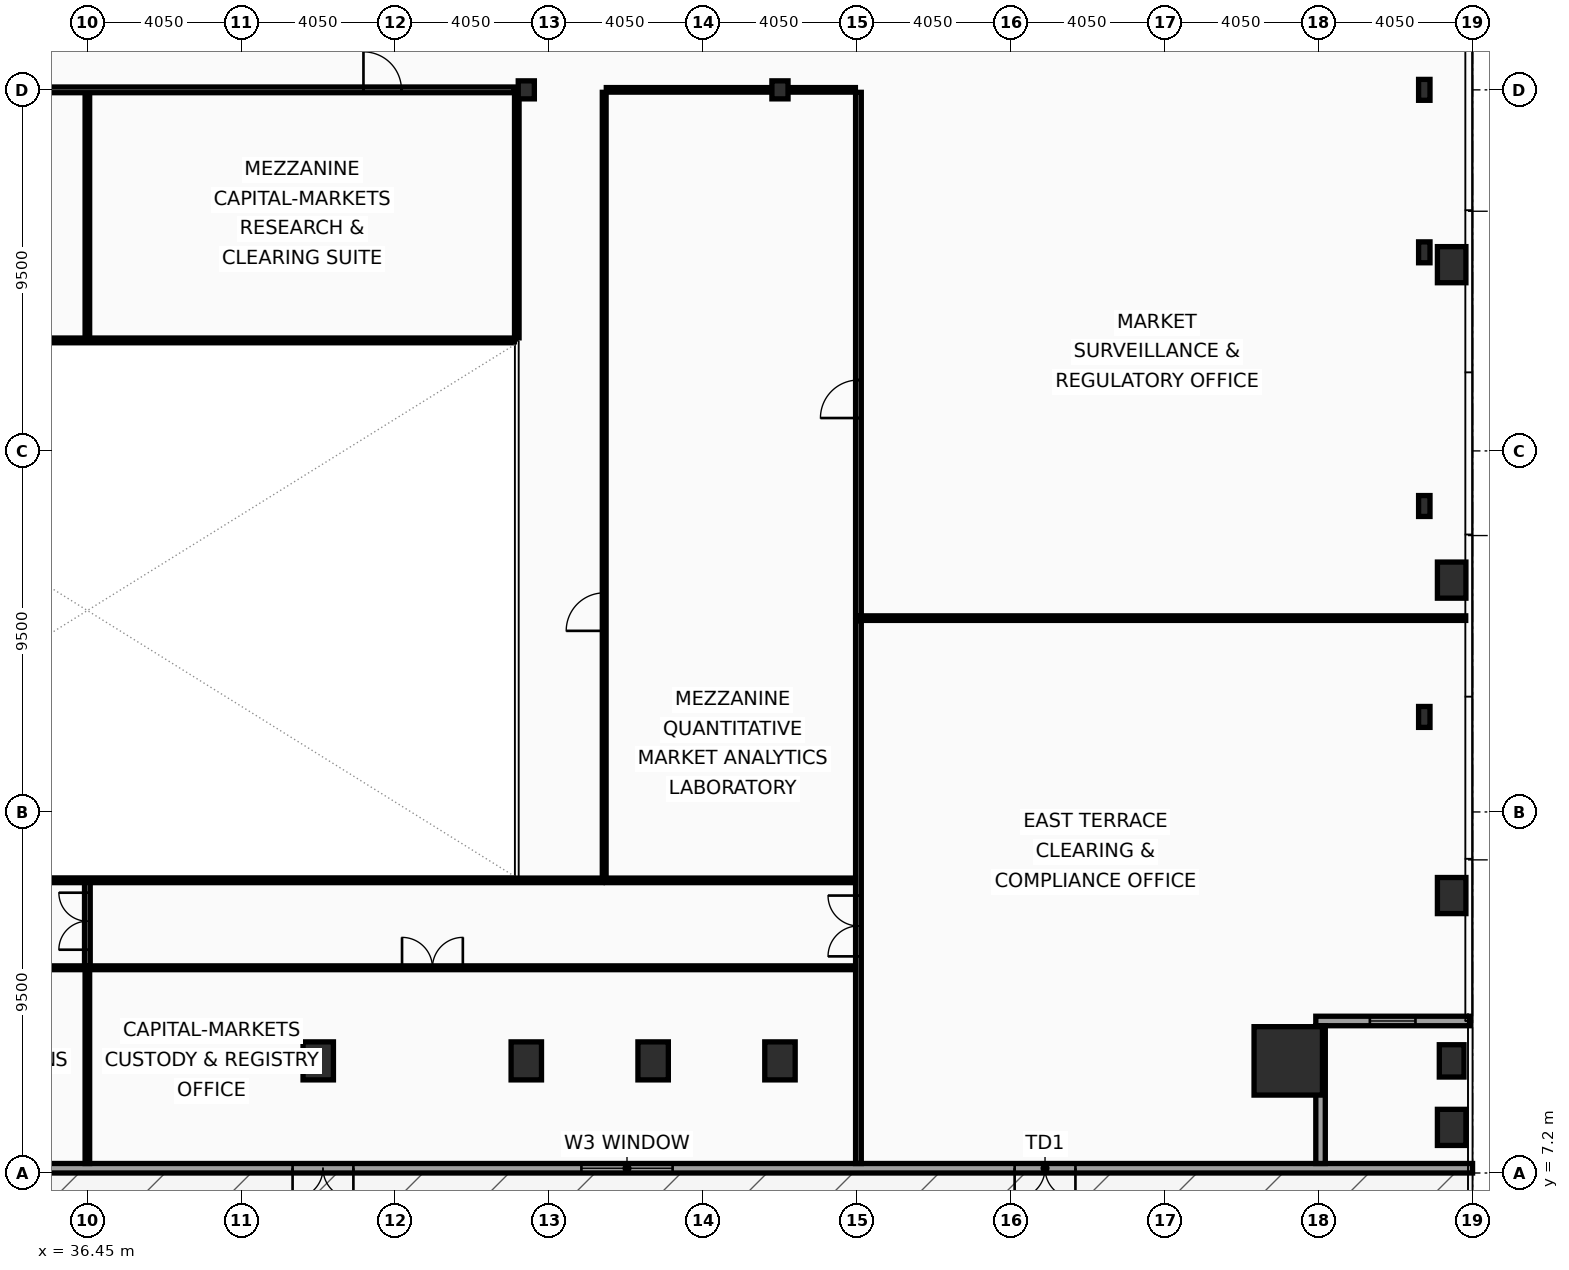
"""IFC4 building model, lengths in metres.
Left out: names, types, materials, properties, quantities, classifications, styles, units other than length and angle.
Written with IfcOpenShell. Run it as: python <this file> out.ifc"""

import sys

from ifc_helpers import new_model, si_unit, direction, frame, frame_2d, origin, origin_2d, place, context, subcontext, project, spatial, rectangle, hollow_rectangle, i_section, extrude, element, fill, save


model = new_model("IFC4")
c1 = context("Model", 3, precision=1e-05, world=origin(), true_north=direction((0.0, 1.0)))
c2 = subcontext(c1, "Body", "Model", "MODEL_VIEW")
j1 = project(units=[si_unit("LENGTHUNIT", "METRE"), si_unit("PLANEANGLEUNIT", "RADIAN")], contexts=[c1])
p1 = place(None, origin())
s1 = spatial("IfcSite", under=j1, at=p1, CompositionType="ELEMENT")
p2 = place(p1, origin())
s2 = spatial("IfcBuilding", under=s1, at=p2, CompositionType="ELEMENT")
p3 = place(p2, frame((0.0, 0.0, 10.4)))
s3 = spatial("IfcBuildingStorey", under=s2, at=p3, CompositionType="ELEMENT", Elevation=10.4)
p4 = place(p3, frame((68.05, 10.15, 0.0), z_axis=(0.0, 0.0, 1.0), x_axis=(1.0, 0.0, 0.0)))
e1 = element("IfcColumn", 1, at=p4, inside=s3, PredefinedType="COLUMN", context=c2, shape_type="SweptSolid", body=[
    extrude(hollow_rectangle(XDim=1.8, YDim=1.8, WallThickness=0.08, at=origin_2d()), origin(), (0.0, 0.0, 1.0), 5.0),
])
for number, where, z_axis, x_axis in (
    (2, (42.525, 10.15, 0.0), (0.0, 0.0, 1.0), (1.0, 0.0, 0.0)),
    (3, (48.0, 10.15, 0.0), (0.0, 0.0, 1.0), (1.0, 0.0, 0.0)),
    (4, (51.337, 10.15, 0.0), (0.0, 0.0, 1.0), (1.0, 0.0, 0.0)),
    (5, (54.675, 10.15, 0.0), (0.0, 0.0, 1.0), (1.0, 0.0, 0.0)),
):
    element("IfcColumn", number, at=place(p3, frame(where, z_axis=z_axis, x_axis=x_axis)), inside=s3, PredefinedType="COLUMN", context=c2, shape_type="SweptSolid", body=[
        extrude(hollow_rectangle(XDim=0.8, YDim=1.0, WallThickness=0.055, at=origin_2d()), origin(), (0.0, 0.0, 1.0), 5.0),
    ])
for number, where, z_axis, x_axis in (
    (6, (71.63, 19.2, 0.0), (0.0, 0.0, 1.0), (1.0, 0.0, 0.0)),
    (7, (71.63, 24.75, 0.0), (0.0, 0.0, 1.0), (1.0, 0.0, 0.0)),
    (8, (71.63, 31.425, 0.0), (0.0, 0.0, 1.0), (1.0, 0.0, 0.0)),
    (9, (71.63, 35.7, 0.0), (0.0, 0.0, 1.0), (1.0, 0.0, 0.0)),
):
    element("IfcColumn", number, at=place(p3, frame(where, z_axis=z_axis, x_axis=x_axis)), inside=s3, PredefinedType="COLUMN", context=c2, shape_type="SweptSolid", body=[
        extrude(i_section(OverallWidth=0.3, OverallDepth=0.55, WebThickness=0.015, FlangeThickness=0.029, at=origin_2d()), origin(), (0.0, 0.0, 1.0), 5.0),
    ])
for number, where, z_axis, x_axis in (
    (10, (48.0, 35.7, 0.0), (0.0, 0.0, 1.0), (1.0, 0.0, 0.0)),
    (11, (54.675, 35.7, 0.0), (0.0, 0.0, 1.0), (1.0, 0.0, 0.0)),
):
    element("IfcColumn", number, at=place(p3, frame(where, z_axis=z_axis, x_axis=x_axis)), inside=s3, PredefinedType="COLUMN", context=c2, shape_type="SweptSolid", body=[
        extrude(i_section(OverallWidth=0.424, OverallDepth=0.474, WebThickness=0.048, FlangeThickness=0.077, at=origin_2d()), origin(), (0.0, 0.0, 1.0), 5.0),
    ])
p5 = place(p3, frame((72.35, 8.4, 0.0), z_axis=(0.0, 0.0, 1.0), x_axis=(1.0, 0.0, 0.0)))
e12 = element("IfcColumn", 12, at=p5, inside=s3, PredefinedType="PILASTER", context=c2, shape_type="SweptSolid", body=[
    extrude(rectangle(XDim=0.75, YDim=0.95, at=origin_2d()), origin(), (0.0, 0.0, 1.0), 5.0),
])
p6 = place(p3, frame((72.35, 10.15, 0.0), z_axis=(0.0, 0.0, 1.0), x_axis=(1.0, 0.0, 0.0)))
e13 = element("IfcColumn", 13, at=p6, inside=s3, PredefinedType="PILASTER", context=c2, shape_type="SweptSolid", body=[
    extrude(rectangle(XDim=0.65, YDim=0.85, at=origin_2d()), origin(), (0.0, 0.0, 1.0), 5.0),
])
for number, where, z_axis, x_axis in (
    (14, (72.35, 14.5, 0.0), (0.0, 0.0, 1.0), (1.0, 0.0, 0.0)),
    (15, (72.35, 22.8, 0.0), (0.0, 0.0, 1.0), (1.0, 0.0, 0.0)),
    (16, (72.35, 31.1, 0.0), (0.0, 0.0, 1.0), (1.0, 0.0, 0.0)),
):
    element("IfcColumn", number, at=place(p3, frame(where, z_axis=z_axis, x_axis=x_axis)), inside=s3, PredefinedType="PILASTER", context=c2, shape_type="SweptSolid", body=[
        extrude(rectangle(XDim=0.75, YDim=0.95, at=origin_2d()), origin(), (0.0, 0.0, 1.0), 5.0),
    ])
p7 = place(p3, frame((72.9, 7.325, 0.0), z_axis=(0.0, 0.0, 1.0), x_axis=(-1.0, 0.0, 0.0)))
e17 = element("IfcWall", 17, at=p7, inside=s3, PredefinedType="SOLIDWALL", context=c2, shape_type="SweptSolid", body=[
    extrude(rectangle(XDim=72.9, YDim=0.25, at=frame_2d((36.45, 0.0))), origin(), (0.0, 0.0, 1.0), 3.89),
])
p8 = place(p7, frame((10.45, 0.0, 0.0)))
e18 = element("IfcOpeningElement", 18, at=p8, cuts=e17, PredefinedType="OPENING", context=c2, shape_type="SweptSolid", body=[
    extrude(rectangle(XDim=1.6, YDim=2.2, at=frame_2d((0.8, 1.1))), frame((0.0, 0.135, 0.0), z_axis=(0.0, -1.0, 0.0), x_axis=(1.0, 0.0, 0.0)), (0.0, 0.0, 1.0), 0.27),
])
p9 = place(p7, frame((29.45, 0.0, 0.0)))
e19 = element("IfcOpeningElement", 19, at=p9, cuts=e17, PredefinedType="OPENING", context=c2, shape_type="SweptSolid", body=[
    extrude(rectangle(XDim=1.6, YDim=2.2, at=frame_2d((0.8, 1.1))), frame((0.0, 0.135, 0.0), z_axis=(0.0, -1.0, 0.0), x_axis=(1.0, 0.0, 0.0)), (0.0, 0.0, 1.0), 0.27),
])
p10 = place(p7, frame((60.65, 0.0, 0.0)))
e20 = element("IfcOpeningElement", 20, at=p10, cuts=e17, PredefinedType="OPENING", context=c2, shape_type="SweptSolid", body=[
    extrude(rectangle(XDim=1.05, YDim=2.15, at=frame_2d((0.525, 1.075))), frame((0.0, 0.135, 0.0), z_axis=(0.0, -1.0, 0.0), x_axis=(1.0, 0.0, 0.0)), (0.0, 0.0, 1.0), 0.27),
])
p11 = place(p7, frame((21.05, 0.0, 0.85)))
e21 = element("IfcOpeningElement", 21, at=p11, cuts=e17, PredefinedType="OPENING", context=c2, shape_type="SweptSolid", body=[
    extrude(rectangle(XDim=2.4, YDim=2.6, at=frame_2d((1.2, 1.3))), frame((0.0, 0.135, 0.0), z_axis=(0.0, -1.0, 0.0), x_axis=(1.0, 0.0, 0.0)), (0.0, 0.0, 1.0), 0.27),
])
p12 = place(p7, frame((49.65, 0.0, 0.85)))
e22 = element("IfcOpeningElement", 22, at=p12, cuts=e17, PredefinedType="OPENING", context=c2, shape_type="SweptSolid", body=[
    extrude(rectangle(XDim=2.4, YDim=2.6, at=frame_2d((1.2, 1.3))), frame((0.0, 0.135, 0.0), z_axis=(0.0, -1.0, 0.0), x_axis=(1.0, 0.0, 0.0)), (0.0, 0.0, 1.0), 0.27),
])
p13 = place(p3, frame((72.82, 11.2, 0.0), z_axis=(0.0, 0.0, 1.0), x_axis=(-1.0, 0.0, 0.0)))
e23 = element("IfcWall", 23, at=p13, inside=s3, PredefinedType="SOLIDWALL", context=c2, shape_type="SweptSolid", body=[
    extrude(rectangle(XDim=4.045, YDim=0.25, at=frame_2d((2.022, 0.0))), origin(), (0.0, 0.0, 1.0), 4.14),
])
p14 = place(p13, frame((1.423, 0.0, 0.9)))
e24 = element("IfcOpeningElement", 24, at=p14, cuts=e23, PredefinedType="OPENING", context=c2, shape_type="SweptSolid", body=[
    extrude(rectangle(XDim=1.2, YDim=2.8, at=frame_2d((0.6, 1.4))), frame((0.0, 0.135, 0.0), z_axis=(0.0, -1.0, 0.0), x_axis=(1.0, 0.0, 0.0)), (0.0, 0.0, 1.0), 0.27),
])
p15 = place(p3, frame((68.9, 11.075, 0.0), z_axis=(0.0, 0.0, 1.0), x_axis=(0.0, -1.0, 0.0)))
e25 = element("IfcWall", 25, at=p15, inside=s3, PredefinedType="SOLIDWALL", context=c2, shape_type="SweptSolid", body=[
    extrude(rectangle(XDim=3.625, YDim=0.25, at=frame_2d((1.812, 0.0))), origin(), (0.0, 0.0, 1.0), 4.14),
])
p16 = place(p3, frame((56.74, 7.45, 0.0), z_axis=(0.0, 0.0, 1.0), x_axis=(0.0, 1.0, 0.0)))
e26 = element("IfcWall", 26, at=p16, inside=s3, PredefinedType="PARTITIONING", context=c2, shape_type="SweptSolid", body=[
    extrude(rectangle(XDim=14.285, YDim=0.15, at=frame_2d((7.143, 0.0))), origin(), (0.0, 0.0, 1.0), 3.89),
])
p17 = place(p16, frame((5.45, 0.0, 0.0)))
e27 = element("IfcOpeningElement", 27, at=p17, cuts=e26, PredefinedType="OPENING", context=c2, shape_type="SweptSolid", body=[
    extrude(rectangle(XDim=1.6, YDim=2.15, at=frame_2d((0.8, 1.075))), frame((0.0, 0.085, 0.0), z_axis=(0.0, -1.0, 0.0), x_axis=(1.0, 0.0, 0.0)), (0.0, 0.0, 1.0), 0.17),
])
p18 = place(p3, frame((56.74, 21.865, 0.0), z_axis=(0.0, 0.0, 1.0), x_axis=(0.0, 1.0, 0.0)))
e28 = element("IfcWall", 28, at=p18, inside=s3, PredefinedType="PARTITIONING", context=c2, shape_type="SweptSolid", body=[
    extrude(rectangle(XDim=13.77, YDim=0.15, at=frame_2d((6.885, 0.0))), origin(), (0.0, 0.0, 1.0), 3.89),
])
p19 = place(p18, frame((5.2, 0.0, 0.0)))
e29 = element("IfcOpeningElement", 29, at=p19, cuts=e28, PredefinedType="OPENING", context=c2, shape_type="SweptSolid", body=[
    extrude(rectangle(XDim=1.0, YDim=2.05, at=frame_2d((0.5, 1.025))), frame((0.0, 0.085, 0.0), z_axis=(0.0, -1.0, 0.0), x_axis=(1.0, 0.0, 0.0)), (0.0, 0.0, 1.0), 0.17),
])
p20 = place(p3, frame((56.82, 21.8, 0.0), z_axis=(0.0, 0.0, 1.0), x_axis=(1.0, 0.0, 0.0)))
e30 = element("IfcWall", 30, at=p20, inside=s3, PredefinedType="PARTITIONING", context=c2, shape_type="SweptSolid", body=[
    extrude(rectangle(XDim=15.9, YDim=0.12, at=frame_2d((7.95, 0.0))), origin(), (0.0, 0.0, 1.0), 4.14),
])
p21 = place(p3, frame((16.24, 12.6, 0.0), z_axis=(0.0, 0.0, 1.0), x_axis=(1.0, 0.0, 0.0)))
e31 = element("IfcWall", 31, at=p21, inside=s3, PredefinedType="MOVABLE", context=c2, shape_type="SweptSolid", body=[
    extrude(rectangle(XDim=20.13, YDim=0.1, at=frame_2d((10.065, 0.0))), origin(), (0.0, 0.0, 1.0), 3.89),
])
p22 = place(p21, frame((8.2, 0.0, 0.0)))
e32 = element("IfcOpeningElement", 32, at=p22, cuts=e31, PredefinedType="OPENING", context=c2, shape_type="SweptSolid", body=[
    extrude(rectangle(XDim=1.6, YDim=2.15, at=frame_2d((0.8, 1.075))), frame((0.0, 0.06, 0.0), z_axis=(0.0, -1.0, 0.0), x_axis=(1.0, 0.0, 0.0)), (0.0, 0.0, 1.0), 0.12),
])
p23 = place(p3, frame((36.53, 12.6, 0.0), z_axis=(0.0, 0.0, 1.0), x_axis=(1.0, 0.0, 0.0)))
e33 = element("IfcWall", 33, at=p23, inside=s3, PredefinedType="MOVABLE", context=c2, shape_type="SweptSolid", body=[
    extrude(rectangle(XDim=20.13, YDim=0.1, at=frame_2d((10.065, 0.0))), origin(), (0.0, 0.0, 1.0), 3.89),
])
p24 = place(p23, frame((8.2, 0.0, 0.0)))
e34 = element("IfcOpeningElement", 34, at=p24, cuts=e33, PredefinedType="OPENING", context=c2, shape_type="SweptSolid", body=[
    extrude(rectangle(XDim=1.6, YDim=2.15, at=frame_2d((0.8, 1.075))), frame((0.0, 0.06, 0.0), z_axis=(0.0, -1.0, 0.0), x_axis=(1.0, 0.0, 0.0)), (0.0, 0.0, 1.0), 0.12),
])
p25 = place(p3, frame((36.45, 7.45, 0.0), z_axis=(0.0, 0.0, 1.0), x_axis=(0.0, 1.0, 0.0)))
e35 = element("IfcWall", 35, at=p25, inside=s3, PredefinedType="PARTITIONING", context=c2, shape_type="SweptSolid", body=[
    extrude(rectangle(XDim=5.095, YDim=0.12, at=frame_2d((2.547, 0.0))), origin(), (0.0, 0.0, 1.0), 4.14),
])
p26 = place(p3, frame((25.215, 29.12, 0.0), z_axis=(0.0, 0.0, 1.0), x_axis=(1.0, 0.0, 0.0)))
e36 = element("IfcWall", 36, at=p26, inside=s3, PredefinedType="MOVABLE", context=c2, shape_type="SweptSolid", body=[
    extrude(rectangle(XDim=22.47, YDim=0.1, at=frame_2d((11.235, 0.0))), origin(), (0.0, 0.0, 1.0), 3.89),
])
p27 = place(p3, frame((36.45, 29.175, 0.0), z_axis=(0.0, 0.0, 1.0), x_axis=(0.0, 1.0, 0.0)))
e37 = element("IfcWall", 37, at=p27, inside=s3, PredefinedType="PARTITIONING", context=c2, shape_type="SweptSolid", body=[
    extrude(rectangle(XDim=6.445, YDim=0.12, at=frame_2d((3.223, 0.0))), origin(), (0.0, 0.0, 1.0), 3.89),
])
p28 = place(p3, frame((25.215, 35.7, 0.0), z_axis=(0.0, 0.0, 1.0), x_axis=(1.0, 0.0, 0.0)))
e38 = element("IfcWall", 38, at=p28, inside=s3, PredefinedType="PARTITIONING", context=c2, shape_type="SweptSolid", body=[
    extrude(rectangle(XDim=22.47, YDim=0.15, at=frame_2d((11.235, 0.0))), origin(), (0.0, 0.0, 1.0), 3.89),
])
p29 = place(p28, frame((6.0, 0.0, 0.0)))
e39 = element("IfcOpeningElement", 39, at=p29, cuts=e38, PredefinedType="OPENING", context=c2, shape_type="SweptSolid", body=[
    extrude(rectangle(XDim=1.0, YDim=2.05, at=frame_2d((0.5, 1.025))), frame((0.0, 0.085, 0.0), z_axis=(0.0, -1.0, 0.0), x_axis=(1.0, 0.0, 0.0)), (0.0, 0.0, 1.0), 0.17),
])
p30 = place(p28, frame((18.5, 0.0, 0.0)))
e40 = element("IfcOpeningElement", 40, at=p30, cuts=e38, PredefinedType="OPENING", context=c2, shape_type="SweptSolid", body=[
    extrude(rectangle(XDim=1.0, YDim=2.05, at=frame_2d((0.5, 1.025))), frame((0.0, 0.085, 0.0), z_axis=(0.0, -1.0, 0.0), x_axis=(1.0, 0.0, 0.0)), (0.0, 0.0, 1.0), 0.17),
])
p31 = place(p3, frame((47.75, 29.175, 0.0), z_axis=(0.0, 0.0, 1.0), x_axis=(0.0, 1.0, 0.0)))
e41 = element("IfcWall", 41, at=p31, inside=s3, PredefinedType="PARTITIONING", context=c2, shape_type="SweptSolid", body=[
    extrude(rectangle(XDim=6.445, YDim=0.12, at=frame_2d((3.223, 0.0))), origin(), (0.0, 0.0, 1.0), 3.89),
])
p32 = place(p3, frame((50.05, 14.965, 0.0), z_axis=(0.0, 0.0, 1.0), x_axis=(0.0, 1.0, 0.0)))
e42 = element("IfcWall", 42, at=p32, inside=s3, PredefinedType="MOVABLE", context=c2, shape_type="SweptSolid", body=[
    extrude(rectangle(XDim=20.67, YDim=0.1, at=frame_2d((10.335, 0.0))), origin(), (0.0, 0.0, 1.0), 4.19),
])
p33 = place(p32, frame((6.5, 0.0, 0.0)))
e43 = element("IfcOpeningElement", 43, at=p33, cuts=e42, PredefinedType="OPENING", context=c2, shape_type="SweptSolid", body=[
    extrude(rectangle(XDim=1.0, YDim=2.05, at=frame_2d((0.5, 1.025))), frame((0.0, 0.06, 0.0), z_axis=(0.0, -1.0, 0.0), x_axis=(1.0, 0.0, 0.0)), (0.0, 0.0, 1.0), 0.12),
])
for number, where, z_axis, x_axis in (
    (44, (50.105, 14.9, 0.0), (0.0, 0.0, 1.0), (1.0, 0.0, 0.0)),
    (45, (50.105, 35.7, 0.0), (0.0, 0.0, 1.0), (1.0, 0.0, 0.0)),
):
    element("IfcWall", number, at=place(p3, frame(where, z_axis=z_axis, x_axis=x_axis)), inside=s3, PredefinedType="PARTITIONING", context=c2, shape_type="SweptSolid", body=[
        extrude(rectangle(XDim=6.555, YDim=0.12, at=frame_2d((3.277, 0.0))), origin(), (0.0, 0.0, 1.0), 3.89),
    ])
p34 = place(p3, frame((36.45, 12.655, 0.0), z_axis=(0.0, 0.0, 1.0), x_axis=(0.0, 1.0, 0.0)))
e46 = element("IfcWall", 46, at=p34, inside=s3, PredefinedType="PARTITIONING", context=c2, shape_type="SweptSolid", body=[
    extrude(rectangle(XDim=2.28, YDim=0.15, at=frame_2d((1.14, 0.0))), origin(), (0.0, 0.0, 1.0), 3.89),
])
p35 = place(p34, frame((0.42, 0.0, 0.0)))
e47 = element("IfcOpeningElement", 47, at=p35, cuts=e46, PredefinedType="OPENING", context=c2, shape_type="SweptSolid", body=[
    extrude(rectangle(XDim=1.5, YDim=2.15, at=frame_2d((0.75, 1.075))), frame((0.0, 0.085, 0.0), z_axis=(0.0, -1.0, 0.0), x_axis=(1.0, 0.0, 0.0)), (0.0, 0.0, 1.0), 0.17),
])
p36 = place(p3, frame((22.905, 14.9, 0.0), z_axis=(0.0, 0.0, 1.0), x_axis=(1.0, 0.0, 0.0)))
e48 = element("IfcWall", 48, at=p36, inside=s3, PredefinedType="PARTITIONING", context=c2, shape_type="SweptSolid", body=[
    extrude(rectangle(XDim=27.09, YDim=0.12, at=frame_2d((13.545, 0.0))), origin(), (0.0, 0.0, 1.0), 3.89),
])
p37 = place(p8, origin())
e49 = element("IfcDoor", 49, at=p37, inside=s3, OperationType="DOUBLE_DOOR_SINGLE_SWING", PredefinedType="DOOR", context=c2, shape_type="SweptSolid", body=[
    extrude(rectangle(XDim=1.6, YDim=2.2, at=frame_2d((0.8, 1.1))), frame((0.0, 0.025, 0.0), z_axis=(0.0, -1.0, 0.0), x_axis=(1.0, 0.0, 0.0)), (0.0, 0.0, 1.0), 0.05),
])
fill(e18, e49)
p38 = place(p9, origin())
e50 = element("IfcDoor", 50, at=p38, inside=s3, OperationType="DOUBLE_DOOR_SINGLE_SWING", PredefinedType="DOOR", context=c2, shape_type="SweptSolid", body=[
    extrude(rectangle(XDim=1.6, YDim=2.2, at=frame_2d((0.8, 1.1))), frame((0.0, 0.025, 0.0), z_axis=(0.0, -1.0, 0.0), x_axis=(1.0, 0.0, 0.0)), (0.0, 0.0, 1.0), 0.05),
])
fill(e19, e50)
p39 = place(p11, origin())
e51 = element("IfcWindow", 51, at=p39, inside=s3, PartitioningType="SINGLE_PANEL", PredefinedType="WINDOW", context=c2, shape_type="SweptSolid", body=[
    extrude(rectangle(XDim=2.4, YDim=2.6, at=frame_2d((1.2, 1.3))), frame((0.0, 0.03, 0.0), z_axis=(0.0, -1.0, 0.0), x_axis=(1.0, 0.0, 0.0)), (0.0, 0.0, 1.0), 0.06),
])
fill(e21, e51)
p40 = place(p14, origin())
e52 = element("IfcWindow", 52, at=p40, inside=s3, PartitioningType="SINGLE_PANEL", PredefinedType="WINDOW", context=c2, shape_type="SweptSolid", body=[
    extrude(rectangle(XDim=1.2, YDim=2.8, at=frame_2d((0.6, 1.4))), frame((0.0, 0.03, 0.0), z_axis=(0.0, -1.0, 0.0), x_axis=(1.0, 0.0, 0.0)), (0.0, 0.0, 1.0), 0.06),
])
fill(e24, e52)
p41 = place(p17, origin())
e53 = element("IfcDoor", 53, at=p41, inside=s3, OperationType="DOUBLE_DOOR_SINGLE_SWING", PredefinedType="DOOR", context=c2, shape_type="SweptSolid", body=[
    extrude(rectangle(XDim=1.6, YDim=2.15, at=frame_2d((0.8, 1.075))), frame((0.0, 0.025, 0.0), z_axis=(0.0, -1.0, 0.0), x_axis=(1.0, 0.0, 0.0)), (0.0, 0.0, 1.0), 0.05),
])
fill(e27, e53)
p42 = place(p19, origin())
e54 = element("IfcDoor", 54, at=p42, inside=s3, OperationType="SINGLE_SWING_LEFT", PredefinedType="DOOR", context=c2, shape_type="SweptSolid", body=[
    extrude(rectangle(XDim=1.0, YDim=2.05, at=frame_2d((0.5, 1.025))), frame((0.0, 0.025, 0.0), z_axis=(0.0, -1.0, 0.0), x_axis=(1.0, 0.0, 0.0)), (0.0, 0.0, 1.0), 0.05),
])
fill(e29, e54)
p43 = place(p24, origin())
e55 = element("IfcDoor", 55, at=p43, inside=s3, OperationType="DOUBLE_DOOR_SINGLE_SWING", PredefinedType="DOOR", context=c2, shape_type="SweptSolid", body=[
    extrude(rectangle(XDim=1.6, YDim=2.15, at=frame_2d((0.8, 1.075))), frame((0.0, 0.025, 0.0), z_axis=(0.0, -1.0, 0.0), x_axis=(1.0, 0.0, 0.0)), (0.0, 0.0, 1.0), 0.05),
])
fill(e34, e55)
p44 = place(p30, origin())
e56 = element("IfcDoor", 56, at=p44, inside=s3, OperationType="SINGLE_SWING_LEFT", PredefinedType="DOOR", context=c2, shape_type="SweptSolid", body=[
    extrude(rectangle(XDim=1.0, YDim=2.05, at=frame_2d((0.5, 1.025))), frame((0.0, 0.025, 0.0), z_axis=(0.0, -1.0, 0.0), x_axis=(1.0, 0.0, 0.0)), (0.0, 0.0, 1.0), 0.05),
])
fill(e40, e56)
p45 = place(p33, origin())
e57 = element("IfcDoor", 57, at=p45, inside=s3, OperationType="SINGLE_SWING_LEFT", PredefinedType="DOOR", context=c2, shape_type="SweptSolid", body=[
    extrude(rectangle(XDim=1.0, YDim=2.05, at=frame_2d((0.5, 1.025))), frame((0.0, 0.025, 0.0), z_axis=(0.0, -1.0, 0.0), x_axis=(1.0, 0.0, 0.0)), (0.0, 0.0, 1.0), 0.05),
])
fill(e43, e57)
p46 = place(p35, origin())
e58 = element("IfcDoor", 58, at=p46, inside=s3, OperationType="DOUBLE_DOOR_SINGLE_SWING", PredefinedType="DOOR", context=c2, shape_type="SweptSolid", body=[
    extrude(rectangle(XDim=1.5, YDim=2.15, at=frame_2d((0.75, 1.075))), frame((0.0, 0.025, 0.0), z_axis=(0.0, -1.0, 0.0), x_axis=(1.0, 0.0, 0.0)), (0.0, 0.0, 1.0), 0.05),
])
fill(e47, e58)
save(model, sys.argv[1])
